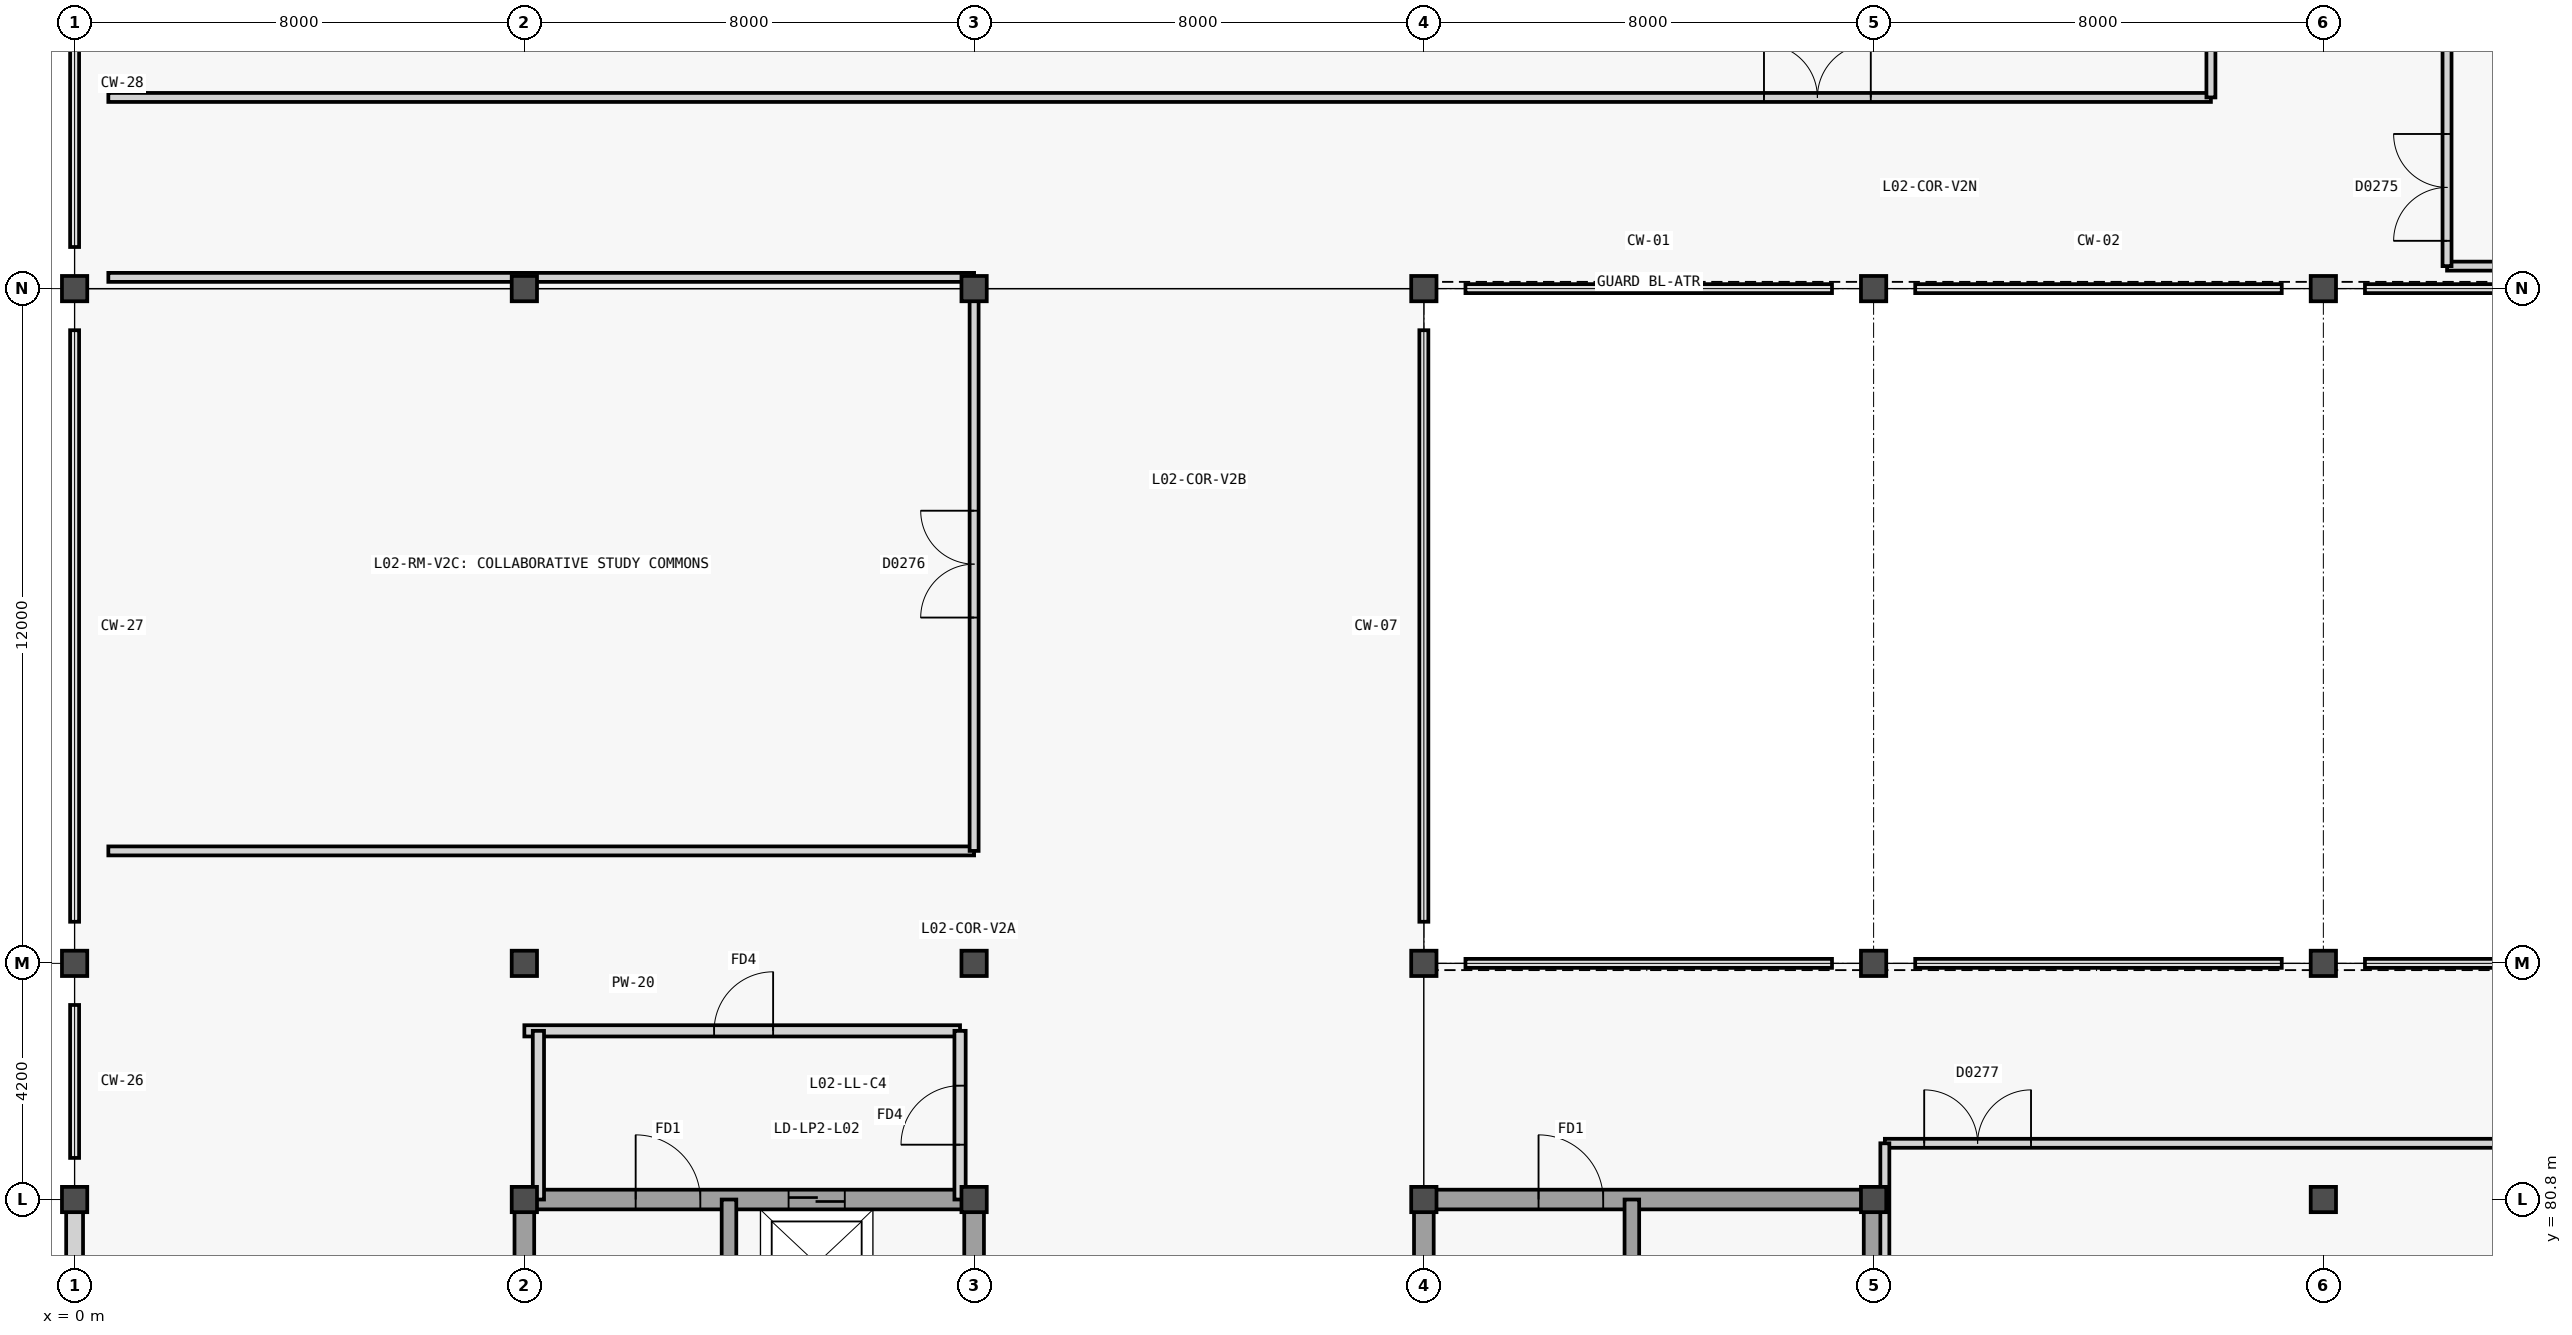
"""IFC4 building model, lengths in metres.
Left out: names, types, materials, properties, quantities, classifications, styles, units other than length and angle.
Written with IfcOpenShell. Run it as: python <this file> out.ifc"""

import sys

from ifc_helpers import new_model, si_unit, direction, frame, frame_2d, origin, origin_2d, place, context, subcontext, project, spatial, rectangle, extrude, element, fill, save


model = new_model("IFC4")
c1 = context("Model", 3, precision=1e-05, world=origin(), true_north=direction((0.0, 1.0)))
c2 = subcontext(c1, "Body", "Model", "MODEL_VIEW")
j1 = project(units=[si_unit("LENGTHUNIT", "METRE"), si_unit("PLANEANGLEUNIT", "RADIAN")], contexts=[c1])
p1 = place(None, origin())
s1 = spatial("IfcSite", under=j1, at=p1, CompositionType="ELEMENT")
p2 = place(p1, origin())
s2 = spatial("IfcBuilding", under=s1, at=p2, CompositionType="ELEMENT")
p3 = place(p2, frame((0.0, 0.0, 10.2)))
s3 = spatial("IfcBuildingStorey", under=s2, at=p3, CompositionType="ELEMENT", Elevation=10.2)
for number, where, z_axis, x_axis in (
    (1, (0.0, 80.8, 0.0), (0.0, 0.0, 1.0), (1.0, 0.0, 0.0)),
    (2, (0.0, 85.0, 0.0), (0.0, 0.0, 1.0), (1.0, 0.0, 0.0)),
    (3, (0.0, 97.0, 0.0), (0.0, 0.0, 1.0), (1.0, 0.0, 0.0)),
    (4, (8.0, 80.8, 0.0), (0.0, 0.0, 1.0), (1.0, 0.0, 0.0)),
    (5, (8.0, 85.0, 0.0), (0.0, 0.0, 1.0), (1.0, 0.0, 0.0)),
    (6, (8.0, 97.0, 0.0), (0.0, 0.0, 1.0), (1.0, 0.0, 0.0)),
    (7, (16.0, 80.8, 0.0), (0.0, 0.0, 1.0), (1.0, 0.0, 0.0)),
    (8, (16.0, 85.0, 0.0), (0.0, 0.0, 1.0), (1.0, 0.0, 0.0)),
    (9, (16.0, 97.0, 0.0), (0.0, 0.0, 1.0), (1.0, 0.0, 0.0)),
    (10, (24.0, 80.8, 0.0), (0.0, 0.0, 1.0), (1.0, 0.0, 0.0)),
    (11, (24.0, 85.0, 0.0), (0.0, 0.0, 1.0), (1.0, 0.0, 0.0)),
    (12, (24.0, 97.0, 0.0), (0.0, 0.0, 1.0), (1.0, 0.0, 0.0)),
    (13, (32.0, 80.8, 0.0), (0.0, 0.0, 1.0), (1.0, 0.0, 0.0)),
    (14, (32.0, 85.0, 0.0), (0.0, 0.0, 1.0), (1.0, 0.0, 0.0)),
    (15, (32.0, 97.0, 0.0), (0.0, 0.0, 1.0), (1.0, 0.0, 0.0)),
    (16, (40.0, 80.8, 0.0), (0.0, 0.0, 1.0), (1.0, 0.0, 0.0)),
    (17, (40.0, 85.0, 0.0), (0.0, 0.0, 1.0), (1.0, 0.0, 0.0)),
    (18, (40.0, 97.0, 0.0), (0.0, 0.0, 1.0), (1.0, 0.0, 0.0)),
):
    element("IfcColumn", number, at=place(p3, frame(where, z_axis=z_axis, x_axis=x_axis)), inside=s3, PredefinedType="COLUMN", context=c2, shape_type="SweptSolid", body=[
        extrude(rectangle(XDim=0.45, YDim=0.45, at=origin_2d()), origin(), (0.0, 0.0, 1.0), 4.2),
    ])
p4 = place(p3, frame((0.0, 72.623, 0.0), z_axis=(0.0, 0.0, 1.0), x_axis=(0.0, 1.0, 0.0)))
e19 = element("IfcWall", 19, at=p4, inside=s3, PredefinedType="SOLIDWALL", context=c2, shape_type="SweptSolid", body=[
    extrude(rectangle(XDim=7.954, YDim=0.3, at=frame_2d((3.977, 0.0))), origin(), (0.0, 0.0, 1.0), 3.36),
])
p5 = place(p4, frame((1.957, 0.0, 0.9)))
e20 = element("IfcOpeningElement", 20, at=p5, cuts=e19, PredefinedType="OPENING", context=c2, shape_type="SweptSolid", body=[
    extrude(rectangle(XDim=1.8, YDim=1.55, at=frame_2d((0.9, 0.775))), frame((0.0, 0.16, 0.0), z_axis=(0.0, -1.0, 0.0), x_axis=(1.0, 0.0, 0.0)), (0.0, 0.0, 1.0), 0.32),
])
for number, where, z_axis, x_axis in (
    (21, (8.0, 72.4, 0.0), (0.0, 0.0, 1.0), (0.0, 1.0, 0.0)),
    (22, (16.0, 72.4, 0.0), (0.0, 0.0, 1.0), (0.0, 1.0, 0.0)),
):
    element("IfcWall", number, at=place(p3, frame(where, z_axis=z_axis, x_axis=x_axis)), inside=s3, PredefinedType="SHEAR", context=c2, shape_type="SweptSolid", body=[
        extrude(rectangle(XDim=8.4, YDim=0.35, at=frame_2d((4.2, 0.0))), origin(), (0.0, 0.0, 1.0), 4.2),
    ])
p6 = place(p3, frame((8.0, 80.8, 0.0), z_axis=(0.0, 0.0, 1.0), x_axis=(1.0, 0.0, 0.0)))
e23 = element("IfcWall", 23, at=p6, inside=s3, PredefinedType="SHEAR", context=c2, shape_type="SweptSolid", body=[
    extrude(rectangle(XDim=8.0, YDim=0.35, at=frame_2d((4.0, 0.0))), origin(), (0.0, 0.0, 1.0), 4.2),
])
p7 = place(p6, frame((1.98, 0.0, 0.0)))
e24 = element("IfcOpeningElement", 24, at=p7, cuts=e23, PredefinedType="OPENING", context=c2, shape_type="SweptSolid", body=[
    extrude(rectangle(XDim=1.15, YDim=2.2, at=frame_2d((0.575, 1.1))), frame((0.0, 0.185, 0.0), z_axis=(0.0, -1.0, 0.0), x_axis=(1.0, 0.0, 0.0)), (0.0, 0.0, 1.0), 0.37),
])
p8 = place(p6, frame((4.7, 0.0, 0.0)))
e25 = element("IfcOpeningElement", 25, at=p8, cuts=e23, PredefinedType="OPENING", context=c2, shape_type="SweptSolid", body=[
    extrude(rectangle(XDim=1.0, YDim=2.15, at=frame_2d((0.5, 1.075))), frame((0.0, 0.185, 0.0), z_axis=(0.0, -1.0, 0.0), x_axis=(1.0, 0.0, 0.0)), (0.0, 0.0, 1.0), 0.37),
])
p9 = place(p3, frame((11.64, 72.4, 0.0), z_axis=(0.0, 0.0, 1.0), x_axis=(0.0, 1.0, 0.0)))
e26 = element("IfcWall", 26, at=p9, inside=s3, PredefinedType="SHEAR", context=c2, shape_type="SweptSolid", body=[
    extrude(rectangle(XDim=8.4, YDim=0.26, at=frame_2d((4.2, 0.0))), origin(), (0.0, 0.0, 1.0), 4.2),
])
p10 = place(p3, frame((8.0, 83.8, 0.0), z_axis=(0.0, 0.0, 1.0), x_axis=(1.0, 0.0, 0.0)))
e27 = element("IfcWall", 27, at=p10, inside=s3, PredefinedType="PARTITIONING", context=c2, shape_type="SweptSolid", body=[
    extrude(rectangle(XDim=7.75, YDim=0.2, at=frame_2d((3.875, 0.0))), origin(), (0.0, 0.0, 1.0), 3.92),
])
p11 = place(p10, frame((3.375, 0.0, 0.0)))
e28 = element("IfcOpeningElement", 28, at=p11, cuts=e27, PredefinedType="OPENING", context=c2, shape_type="SweptSolid", body=[
    extrude(rectangle(XDim=1.05, YDim=2.15, at=frame_2d((0.525, 1.075))), frame((0.0, 0.11, 0.0), z_axis=(0.0, -1.0, 0.0), x_axis=(1.0, 0.0, 0.0)), (0.0, 0.0, 1.0), 0.22),
])
p12 = place(p3, frame((15.75, 80.8, 0.0), z_axis=(0.0, 0.0, 1.0), x_axis=(0.0, 1.0, 0.0)))
e29 = element("IfcWall", 29, at=p12, inside=s3, PredefinedType="PARTITIONING", context=c2, shape_type="SweptSolid", body=[
    extrude(rectangle(XDim=3.0, YDim=0.2, at=frame_2d((1.5, 0.0))), origin(), (0.0, 0.0, 1.0), 3.36),
])
p13 = place(p12, frame((0.975, 0.0, 0.0)))
e30 = element("IfcOpeningElement", 30, at=p13, cuts=e29, PredefinedType="OPENING", context=c2, shape_type="SweptSolid", body=[
    extrude(rectangle(XDim=1.05, YDim=2.15, at=frame_2d((0.525, 1.075))), frame((0.0, 0.11, 0.0), z_axis=(0.0, -1.0, 0.0), x_axis=(1.0, 0.0, 0.0)), (0.0, 0.0, 1.0), 0.22),
])
p14 = place(p3, frame((8.25, 80.8, 0.0), z_axis=(0.0, 0.0, 1.0), x_axis=(0.0, 1.0, 0.0)))
e31 = element("IfcWall", 31, at=p14, inside=s3, PredefinedType="PARTITIONING", context=c2, shape_type="SweptSolid", body=[
    extrude(rectangle(XDim=3.0, YDim=0.2, at=frame_2d((1.5, 0.0))), origin(), (0.0, 0.0, 1.0), 3.36),
])
for number, where, z_axis, x_axis in (
    (32, (24.0, 72.4, 0.0), (0.0, 0.0, 1.0), (0.0, 1.0, 0.0)),
    (33, (32.0, 72.4, 0.0), (0.0, 0.0, 1.0), (0.0, 1.0, 0.0)),
):
    element("IfcWall", number, at=place(p3, frame(where, z_axis=z_axis, x_axis=x_axis)), inside=s3, PredefinedType="SHEAR", context=c2, shape_type="SweptSolid", body=[
        extrude(rectangle(XDim=8.4, YDim=0.35, at=frame_2d((4.2, 0.0))), origin(), (0.0, 0.0, 1.0), 4.2),
    ])
p15 = place(p3, frame((24.0, 80.8, 0.0), z_axis=(0.0, 0.0, 1.0), x_axis=(1.0, 0.0, 0.0)))
e34 = element("IfcWall", 34, at=p15, inside=s3, PredefinedType="SHEAR", context=c2, shape_type="SweptSolid", body=[
    extrude(rectangle(XDim=8.0, YDim=0.35, at=frame_2d((4.0, 0.0))), origin(), (0.0, 0.0, 1.0), 4.2),
])
p16 = place(p15, frame((2.04, 0.0, 0.0)))
e35 = element("IfcOpeningElement", 35, at=p16, cuts=e34, PredefinedType="OPENING", context=c2, shape_type="SweptSolid", body=[
    extrude(rectangle(XDim=1.15, YDim=2.2, at=frame_2d((0.575, 1.1))), frame((0.0, 0.185, 0.0), z_axis=(0.0, -1.0, 0.0), x_axis=(1.0, 0.0, 0.0)), (0.0, 0.0, 1.0), 0.37),
])
p17 = place(p3, frame((27.7, 72.4, 0.0), z_axis=(0.0, 0.0, 1.0), x_axis=(0.0, 1.0, 0.0)))
e36 = element("IfcWall", 36, at=p17, inside=s3, PredefinedType="SHEAR", context=c2, shape_type="SweptSolid", body=[
    extrude(rectangle(XDim=8.4, YDim=0.26, at=frame_2d((4.2, 0.0))), origin(), (0.0, 0.0, 1.0), 4.2),
])
p18 = place(p3, frame((0.6, 100.4, 0.0), z_axis=(0.0, 0.0, 1.0), x_axis=(1.0, 0.0, 0.0)))
e37 = element("IfcWall", 37, at=p18, inside=s3, PredefinedType="PARTITIONING", context=c2, shape_type="SweptSolid", body=[
    extrude(rectangle(XDim=37.4, YDim=0.16, at=frame_2d((18.7, 0.0))), origin(), (0.0, 0.0, 1.0), 3.94),
])
p19 = place(p18, frame((29.45, 0.0, 0.0)))
e38 = element("IfcOpeningElement", 38, at=p19, cuts=e37, PredefinedType="OPENING", context=c2, shape_type="SweptSolid", body=[
    extrude(rectangle(XDim=1.9, YDim=2.3, at=frame_2d((0.95, 1.15))), frame((0.0, 0.09, 0.0), z_axis=(0.0, -1.0, 0.0), x_axis=(1.0, 0.0, 0.0)), (0.0, 0.0, 1.0), 0.18),
])
p20 = place(p3, frame((38.0, 100.4, 0.0), z_axis=(0.0, 0.0, 1.0), x_axis=(0.0, 1.0, 0.0)))
e39 = element("IfcWall", 39, at=p20, inside=s3, PredefinedType="PARTITIONING", context=c2, shape_type="SweptSolid", body=[
    extrude(rectangle(XDim=9.8, YDim=0.16, at=frame_2d((4.9, 0.0))), origin(), (0.0, 0.0, 1.0), 3.94),
])
p21 = place(p3, frame((42.2, 97.4, 0.0), z_axis=(0.0, 0.0, 1.0), x_axis=(1.0, 0.0, 0.0)))
e40 = element("IfcWall", 40, at=p21, inside=s3, PredefinedType="PARTITIONING", context=c2, shape_type="SweptSolid", body=[
    extrude(rectangle(XDim=29.6, YDim=0.16, at=frame_2d((14.8, 0.0))), origin(), (0.0, 0.0, 1.0), 3.94),
])
p22 = place(p3, frame((42.2, 97.4, 0.0), z_axis=(0.0, 0.0, 1.0), x_axis=(0.0, 1.0, 0.0)))
e41 = element("IfcWall", 41, at=p22, inside=s3, PredefinedType="PARTITIONING", context=c2, shape_type="SweptSolid", body=[
    extrude(rectangle(XDim=12.8, YDim=0.16, at=frame_2d((6.4, 0.0))), origin(), (0.0, 0.0, 1.0), 3.94),
])
p23 = place(p22, frame((0.45, 0.0, 0.0)))
e42 = element("IfcOpeningElement", 42, at=p23, cuts=e41, PredefinedType="OPENING", context=c2, shape_type="SweptSolid", body=[
    extrude(rectangle(XDim=1.9, YDim=2.3, at=frame_2d((0.95, 1.15))), frame((0.0, 0.09, 0.0), z_axis=(0.0, -1.0, 0.0), x_axis=(1.0, 0.0, 0.0)), (0.0, 0.0, 1.0), 0.18),
])
p24 = place(p3, frame((0.6, 87.0, 0.0), z_axis=(0.0, 0.0, 1.0), x_axis=(1.0, 0.0, 0.0)))
e43 = element("IfcWall", 43, at=p24, inside=s3, PredefinedType="PARTITIONING", context=c2, shape_type="SweptSolid", body=[
    extrude(rectangle(XDim=15.4, YDim=0.16, at=frame_2d((7.7, 0.0))), origin(), (0.0, 0.0, 1.0), 3.94),
])
p25 = place(p3, frame((0.6, 97.2, 0.0), z_axis=(0.0, 0.0, 1.0), x_axis=(1.0, 0.0, 0.0)))
e44 = element("IfcWall", 44, at=p25, inside=s3, PredefinedType="PARTITIONING", context=c2, shape_type="SweptSolid", body=[
    extrude(rectangle(XDim=15.4, YDim=0.16, at=frame_2d((7.7, 0.0))), origin(), (0.0, 0.0, 1.0), 3.28),
])
p26 = place(p3, frame((16.0, 87.0, 0.0), z_axis=(0.0, 0.0, 1.0), x_axis=(0.0, 1.0, 0.0)))
e45 = element("IfcWall", 45, at=p26, inside=s3, PredefinedType="PARTITIONING", context=c2, shape_type="SweptSolid", body=[
    extrude(rectangle(XDim=10.2, YDim=0.16, at=frame_2d((5.1, 0.0))), origin(), (0.0, 0.0, 1.0), 3.31),
])
p27 = place(p26, frame((4.15, 0.0, 0.0)))
e46 = element("IfcOpeningElement", 46, at=p27, cuts=e45, PredefinedType="OPENING", context=c2, shape_type="SweptSolid", body=[
    extrude(rectangle(XDim=1.9, YDim=2.3, at=frame_2d((0.95, 1.15))), frame((0.0, 0.09, 0.0), z_axis=(0.0, -1.0, 0.0), x_axis=(1.0, 0.0, 0.0)), (0.0, 0.0, 1.0), 0.18),
])
p28 = place(p3, frame((32.2, 81.8, 0.0), z_axis=(0.0, 0.0, 1.0), x_axis=(1.0, 0.0, 0.0)))
e47 = element("IfcWall", 47, at=p28, inside=s3, PredefinedType="PARTITIONING", context=c2, shape_type="SweptSolid", body=[
    extrude(rectangle(XDim=15.6, YDim=0.16, at=frame_2d((7.8, 0.0))), origin(), (0.0, 0.0, 1.0), 3.94),
])
p29 = place(p28, frame((0.7, 0.0, 0.0)))
e48 = element("IfcOpeningElement", 48, at=p29, cuts=e47, PredefinedType="OPENING", context=c2, shape_type="SweptSolid", body=[
    extrude(rectangle(XDim=1.9, YDim=2.3, at=frame_2d((0.95, 1.15))), frame((0.0, 0.09, 0.0), z_axis=(0.0, -1.0, 0.0), x_axis=(1.0, 0.0, 0.0)), (0.0, 0.0, 1.0), 0.18),
])
p30 = place(p3, frame((32.2, 65.5, 0.0), z_axis=(0.0, 0.0, 1.0), x_axis=(0.0, 1.0, 0.0)))
e49 = element("IfcWall", 49, at=p30, inside=s3, PredefinedType="PARTITIONING", context=c2, shape_type="SweptSolid", body=[
    extrude(rectangle(XDim=16.3, YDim=0.16, at=frame_2d((8.15, 0.0))), origin(), (0.0, 0.0, 1.0), 3.36),
])
p31 = place(p7, origin())
e50 = element("IfcDoor", 50, at=p31, inside=s3, OperationType="SINGLE_SWING_LEFT", PredefinedType="DOOR", context=c2, shape_type="SweptSolid", body=[
    extrude(rectangle(XDim=1.15, YDim=2.2, at=frame_2d((0.575, 1.1))), frame((0.0, 0.025, 0.0), z_axis=(0.0, -1.0, 0.0), x_axis=(1.0, 0.0, 0.0)), (0.0, 0.0, 1.0), 0.05),
])
fill(e24, e50)
p32 = place(p8, origin())
e51 = element("IfcDoor", 51, at=p32, inside=s3, OperationType="DOUBLE_DOOR_SLIDING", PredefinedType="DOOR", context=c2, shape_type="SweptSolid", body=[
    extrude(rectangle(XDim=1.0, YDim=2.15, at=frame_2d((0.5, 1.075))), frame((0.0, 0.025, 0.0), z_axis=(0.0, -1.0, 0.0), x_axis=(1.0, 0.0, 0.0)), (0.0, 0.0, 1.0), 0.05),
])
fill(e25, e51)
p33 = place(p11, origin())
e52 = element("IfcDoor", 52, at=p33, inside=s3, OperationType="SINGLE_SWING_RIGHT", PredefinedType="DOOR", context=c2, shape_type="SweptSolid", body=[
    extrude(rectangle(XDim=1.05, YDim=2.15, at=frame_2d((0.525, 1.075))), frame((0.0, 0.025, 0.0), z_axis=(0.0, -1.0, 0.0), x_axis=(1.0, 0.0, 0.0)), (0.0, 0.0, 1.0), 0.05),
])
fill(e28, e52)
p34 = place(p13, origin())
e53 = element("IfcDoor", 53, at=p34, inside=s3, OperationType="SINGLE_SWING_LEFT", PredefinedType="DOOR", context=c2, shape_type="SweptSolid", body=[
    extrude(rectangle(XDim=1.05, YDim=2.15, at=frame_2d((0.525, 1.075))), frame((0.0, 0.025, 0.0), z_axis=(0.0, -1.0, 0.0), x_axis=(1.0, 0.0, 0.0)), (0.0, 0.0, 1.0), 0.05),
])
fill(e30, e53)
p35 = place(p16, origin())
e54 = element("IfcDoor", 54, at=p35, inside=s3, OperationType="SINGLE_SWING_LEFT", PredefinedType="DOOR", context=c2, shape_type="SweptSolid", body=[
    extrude(rectangle(XDim=1.15, YDim=2.2, at=frame_2d((0.575, 1.1))), frame((0.0, 0.025, 0.0), z_axis=(0.0, -1.0, 0.0), x_axis=(1.0, 0.0, 0.0)), (0.0, 0.0, 1.0), 0.05),
])
fill(e35, e54)
p36 = place(p19, origin())
e55 = element("IfcDoor", 55, at=p36, inside=s3, OperationType="DOUBLE_DOOR_SINGLE_SWING", PredefinedType="DOOR", context=c2, shape_type="SweptSolid", body=[
    extrude(rectangle(XDim=1.9, YDim=2.3, at=frame_2d((0.95, 1.15))), frame((0.0, 0.025, 0.0), z_axis=(0.0, -1.0, 0.0), x_axis=(1.0, 0.0, 0.0)), (0.0, 0.0, 1.0), 0.05),
])
fill(e38, e55)
p37 = place(p23, origin())
e56 = element("IfcDoor", 56, at=p37, inside=s3, OperationType="DOUBLE_DOOR_SINGLE_SWING", PredefinedType="DOOR", context=c2, shape_type="SweptSolid", body=[
    extrude(rectangle(XDim=1.9, YDim=2.3, at=frame_2d((0.95, 1.15))), frame((0.0, 0.025, 0.0), z_axis=(0.0, -1.0, 0.0), x_axis=(1.0, 0.0, 0.0)), (0.0, 0.0, 1.0), 0.05),
])
fill(e42, e56)
p38 = place(p27, origin())
e57 = element("IfcDoor", 57, at=p38, inside=s3, OperationType="DOUBLE_DOOR_SINGLE_SWING", PredefinedType="DOOR", context=c2, shape_type="SweptSolid", body=[
    extrude(rectangle(XDim=1.9, YDim=2.3, at=frame_2d((0.95, 1.15))), frame((0.0, 0.025, 0.0), z_axis=(0.0, -1.0, 0.0), x_axis=(1.0, 0.0, 0.0)), (0.0, 0.0, 1.0), 0.05),
])
fill(e46, e57)
p39 = place(p29, origin())
e58 = element("IfcDoor", 58, at=p39, inside=s3, OperationType="DOUBLE_DOOR_SINGLE_SWING", PredefinedType="DOOR", context=c2, shape_type="SweptSolid", body=[
    extrude(rectangle(XDim=1.9, YDim=2.3, at=frame_2d((0.95, 1.15))), frame((0.0, 0.025, 0.0), z_axis=(0.0, -1.0, 0.0), x_axis=(1.0, 0.0, 0.0)), (0.0, 0.0, 1.0), 0.05),
])
fill(e48, e58)
save(model, sys.argv[1])
